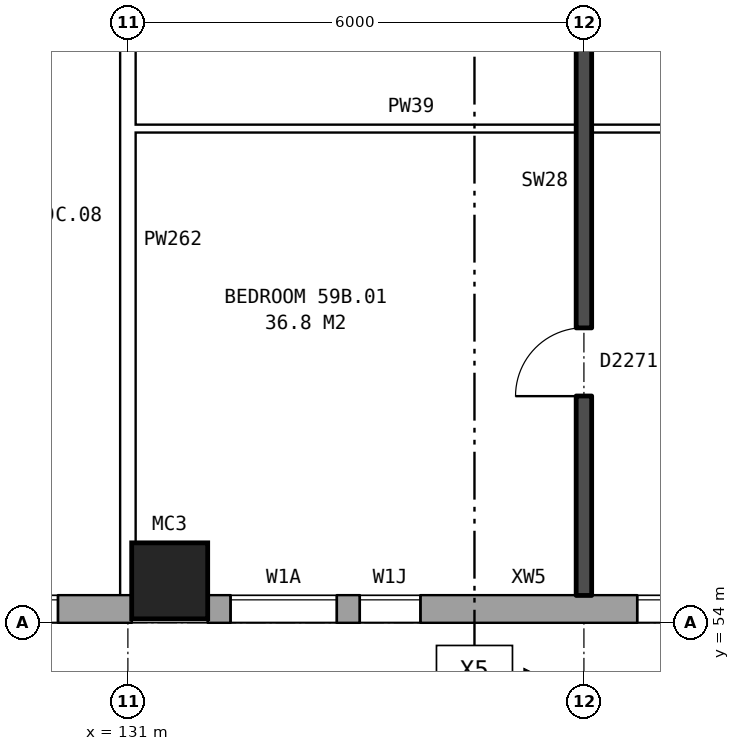
"""IFC4 building model, lengths in metres.
Left out: names, types, materials, properties, quantities, classifications, styles, units other than length and angle.
Written with IfcOpenShell. Run it as: python <this file> out.ifc"""

import sys

from ifc_helpers import new_model, si_unit, direction, frame, frame_2d, origin, origin_2d, place, context, subcontext, project, spatial, rectangle, hollow_rectangle, extrude, element, fill, save


model = new_model("IFC4")
c1 = context("Model", 3, precision=1e-05, world=origin(), true_north=direction((0.0, 1.0)))
c2 = subcontext(c1, "Body", "Model", "MODEL_VIEW")
j1 = project(units=[si_unit("LENGTHUNIT", "METRE"), si_unit("PLANEANGLEUNIT", "RADIAN")], contexts=[c1])
p1 = place(None, origin())
s1 = spatial("IfcSite", under=j1, at=p1, CompositionType="ELEMENT")
p2 = place(p1, origin())
s2 = spatial("IfcBuilding", under=s1, at=p2, CompositionType="ELEMENT")
p3 = place(p2, frame((0.0, 0.0, 209.0)))
s3 = spatial("IfcBuildingStorey", under=s2, at=p3, CompositionType="ELEMENT", Elevation=209.0)
p4 = place(p3, frame((131.55, 54.55, 0.0), z_axis=(0.0, 0.0, 1.0), x_axis=(1.0, 0.0, 0.0)))
e1 = element("IfcColumn", 1, at=p4, inside=s3, PredefinedType="COLUMN", context=c2, shape_type="SweptSolid", body=[
    extrude(hollow_rectangle(XDim=1.0, YDim=1.0, WallThickness=0.055, at=origin_2d()), origin(), (0.0, 0.0, 1.0), 3.1),
])
p5 = place(p3, frame((75.95, 54.18, 0.0), z_axis=(0.0, 0.0, 1.0), x_axis=(1.0, 0.0, 0.0)))
e2 = element("IfcWall", 2, at=p5, inside=s3, PredefinedType="STANDARD", context=c2, shape_type="SweptSolid", body=[
    extrude(rectangle(XDim=55.1, YDim=0.36, at=frame_2d((27.55, 0.0))), origin(), (0.0, 0.0, 1.0), 2.85),
])
p6 = place(p5, frame((0.969, 0.0, 0.8)))
e3 = element("IfcOpeningElement", 3, at=p6, cuts=e2, PredefinedType="OPENING", context=c2, shape_type="SweptSolid", body=[
    extrude(rectangle(XDim=1.6, YDim=1.8, at=frame_2d((0.8, 0.9))), frame((0.0, 0.19, 0.0), z_axis=(0.0, -1.0, 0.0), x_axis=(1.0, 0.0, 0.0)), (0.0, 0.0, 1.0), 0.38),
])
p7 = place(p5, frame((4.406, 0.0, 0.8)))
e4 = element("IfcOpeningElement", 4, at=p7, cuts=e2, PredefinedType="OPENING", context=c2, shape_type="SweptSolid", body=[
    extrude(rectangle(XDim=1.6, YDim=1.8, at=frame_2d((0.8, 0.9))), frame((0.0, 0.19, 0.0), z_axis=(0.0, -1.0, 0.0), x_axis=(1.0, 0.0, 0.0)), (0.0, 0.0, 1.0), 0.38),
])
p8 = place(p5, frame((7.844, 0.0, 0.8)))
e5 = element("IfcOpeningElement", 5, at=p8, cuts=e2, PredefinedType="OPENING", context=c2, shape_type="SweptSolid", body=[
    extrude(rectangle(XDim=1.6, YDim=1.8, at=frame_2d((0.8, 0.9))), frame((0.0, 0.19, 0.0), z_axis=(0.0, -1.0, 0.0), x_axis=(1.0, 0.0, 0.0)), (0.0, 0.0, 1.0), 0.38),
])
p9 = place(p5, frame((11.281, 0.0, 0.8)))
e6 = element("IfcOpeningElement", 6, at=p9, cuts=e2, PredefinedType="OPENING", context=c2, shape_type="SweptSolid", body=[
    extrude(rectangle(XDim=1.6, YDim=1.8, at=frame_2d((0.8, 0.9))), frame((0.0, 0.19, 0.0), z_axis=(0.0, -1.0, 0.0), x_axis=(1.0, 0.0, 0.0)), (0.0, 0.0, 1.0), 0.38),
])
p10 = place(p5, frame((14.719, 0.0, 0.8)))
e7 = element("IfcOpeningElement", 7, at=p10, cuts=e2, PredefinedType="OPENING", context=c2, shape_type="SweptSolid", body=[
    extrude(rectangle(XDim=1.6, YDim=1.8, at=frame_2d((0.8, 0.9))), frame((0.0, 0.19, 0.0), z_axis=(0.0, -1.0, 0.0), x_axis=(1.0, 0.0, 0.0)), (0.0, 0.0, 1.0), 0.38),
])
p11 = place(p5, frame((18.156, 0.0, 0.8)))
e8 = element("IfcOpeningElement", 8, at=p11, cuts=e2, PredefinedType="OPENING", context=c2, shape_type="SweptSolid", body=[
    extrude(rectangle(XDim=1.6, YDim=1.8, at=frame_2d((0.8, 0.9))), frame((0.0, 0.19, 0.0), z_axis=(0.0, -1.0, 0.0), x_axis=(1.0, 0.0, 0.0)), (0.0, 0.0, 1.0), 0.38),
])
p12 = place(p5, frame((21.594, 0.0, 0.8)))
e9 = element("IfcOpeningElement", 9, at=p12, cuts=e2, PredefinedType="OPENING", context=c2, shape_type="SweptSolid", body=[
    extrude(rectangle(XDim=1.6, YDim=1.8, at=frame_2d((0.8, 0.9))), frame((0.0, 0.19, 0.0), z_axis=(0.0, -1.0, 0.0), x_axis=(1.0, 0.0, 0.0)), (0.0, 0.0, 1.0), 0.38),
])
p13 = place(p5, frame((25.031, 0.0, 0.8)))
e10 = element("IfcOpeningElement", 10, at=p13, cuts=e2, PredefinedType="OPENING", context=c2, shape_type="SweptSolid", body=[
    extrude(rectangle(XDim=1.6, YDim=1.8, at=frame_2d((0.8, 0.9))), frame((0.0, 0.19, 0.0), z_axis=(0.0, -1.0, 0.0), x_axis=(1.0, 0.0, 0.0)), (0.0, 0.0, 1.0), 0.38),
])
p14 = place(p5, frame((28.469, 0.0, 0.8)))
e11 = element("IfcOpeningElement", 11, at=p14, cuts=e2, PredefinedType="OPENING", context=c2, shape_type="SweptSolid", body=[
    extrude(rectangle(XDim=1.6, YDim=1.8, at=frame_2d((0.8, 0.9))), frame((0.0, 0.19, 0.0), z_axis=(0.0, -1.0, 0.0), x_axis=(1.0, 0.0, 0.0)), (0.0, 0.0, 1.0), 0.38),
])
p15 = place(p5, frame((31.906, 0.0, 0.8)))
e12 = element("IfcOpeningElement", 12, at=p15, cuts=e2, PredefinedType="OPENING", context=c2, shape_type="SweptSolid", body=[
    extrude(rectangle(XDim=1.6, YDim=1.8, at=frame_2d((0.8, 0.9))), frame((0.0, 0.19, 0.0), z_axis=(0.0, -1.0, 0.0), x_axis=(1.0, 0.0, 0.0)), (0.0, 0.0, 1.0), 0.38),
])
p16 = place(p5, frame((35.344, 0.0, 0.8)))
e13 = element("IfcOpeningElement", 13, at=p16, cuts=e2, PredefinedType="OPENING", context=c2, shape_type="SweptSolid", body=[
    extrude(rectangle(XDim=1.6, YDim=1.8, at=frame_2d((0.8, 0.9))), frame((0.0, 0.19, 0.0), z_axis=(0.0, -1.0, 0.0), x_axis=(1.0, 0.0, 0.0)), (0.0, 0.0, 1.0), 0.38),
])
p17 = place(p5, frame((38.781, 0.0, 0.8)))
e14 = element("IfcOpeningElement", 14, at=p17, cuts=e2, PredefinedType="OPENING", context=c2, shape_type="SweptSolid", body=[
    extrude(rectangle(XDim=1.6, YDim=1.8, at=frame_2d((0.8, 0.9))), frame((0.0, 0.19, 0.0), z_axis=(0.0, -1.0, 0.0), x_axis=(1.0, 0.0, 0.0)), (0.0, 0.0, 1.0), 0.38),
])
p18 = place(p5, frame((42.219, 0.0, 0.8)))
e15 = element("IfcOpeningElement", 15, at=p18, cuts=e2, PredefinedType="OPENING", context=c2, shape_type="SweptSolid", body=[
    extrude(rectangle(XDim=1.6, YDim=1.8, at=frame_2d((0.8, 0.9))), frame((0.0, 0.19, 0.0), z_axis=(0.0, -1.0, 0.0), x_axis=(1.0, 0.0, 0.0)), (0.0, 0.0, 1.0), 0.38),
])
p19 = place(p5, frame((45.656, 0.0, 0.8)))
e16 = element("IfcOpeningElement", 16, at=p19, cuts=e2, PredefinedType="OPENING", context=c2, shape_type="SweptSolid", body=[
    extrude(rectangle(XDim=1.6, YDim=1.8, at=frame_2d((0.8, 0.9))), frame((0.0, 0.19, 0.0), z_axis=(0.0, -1.0, 0.0), x_axis=(1.0, 0.0, 0.0)), (0.0, 0.0, 1.0), 0.38),
])
p20 = place(p5, frame((49.094, 0.0, 0.8)))
e17 = element("IfcOpeningElement", 17, at=p20, cuts=e2, PredefinedType="OPENING", context=c2, shape_type="SweptSolid", body=[
    extrude(rectangle(XDim=1.6, YDim=1.8, at=frame_2d((0.8, 0.9))), frame((0.0, 0.19, 0.0), z_axis=(0.0, -1.0, 0.0), x_axis=(1.0, 0.0, 0.0)), (0.0, 0.0, 1.0), 0.38),
])
p21 = place(p5, frame((52.531, 0.0, 0.8)))
e18 = element("IfcOpeningElement", 18, at=p21, cuts=e2, PredefinedType="OPENING", context=c2, shape_type="SweptSolid", body=[
    extrude(rectangle(XDim=1.6, YDim=1.8, at=frame_2d((0.8, 0.9))), frame((0.0, 0.19, 0.0), z_axis=(0.0, -1.0, 0.0), x_axis=(1.0, 0.0, 0.0)), (0.0, 0.0, 1.0), 0.38),
])
p22 = place(p3, frame((132.05, 54.18, 0.0), z_axis=(0.0, 0.0, 1.0), x_axis=(1.0, 0.0, 0.0)))
e19 = element("IfcWall", 19, at=p22, inside=s3, PredefinedType="STANDARD", context=c2, shape_type="SweptSolid", body=[
    extrude(rectangle(XDim=33.875, YDim=0.36, at=frame_2d((16.938, 0.0))), origin(), (0.0, 0.0, 1.0), 2.85),
])
p23 = place(p22, frame((0.3, 0.0, 0.8)))
e20 = element("IfcOpeningElement", 20, at=p23, cuts=e19, PredefinedType="OPENING", context=c2, shape_type="SweptSolid", body=[
    extrude(rectangle(XDim=1.4, YDim=1.8, at=frame_2d((0.7, 0.9))), frame((0.0, 0.19, 0.0), z_axis=(0.0, -1.0, 0.0), x_axis=(1.0, 0.0, 0.0)), (0.0, 0.0, 1.0), 0.38),
])
p24 = place(p22, frame((5.65, 0.0, 0.8)))
e21 = element("IfcOpeningElement", 21, at=p24, cuts=e19, PredefinedType="OPENING", context=c2, shape_type="SweptSolid", body=[
    extrude(rectangle(XDim=1.6, YDim=1.8, at=frame_2d((0.8, 0.9))), frame((0.0, 0.19, 0.0), z_axis=(0.0, -1.0, 0.0), x_axis=(1.0, 0.0, 0.0)), (0.0, 0.0, 1.0), 0.38),
])
p25 = place(p22, frame((8.65, 0.0, 0.8)))
e22 = element("IfcOpeningElement", 22, at=p25, cuts=e19, PredefinedType="OPENING", context=c2, shape_type="SweptSolid", body=[
    extrude(rectangle(XDim=1.6, YDim=1.8, at=frame_2d((0.8, 0.9))), frame((0.0, 0.19, 0.0), z_axis=(0.0, -1.0, 0.0), x_axis=(1.0, 0.0, 0.0)), (0.0, 0.0, 1.0), 0.38),
])
p26 = place(p22, frame((11.65, 0.0, 0.8)))
e23 = element("IfcOpeningElement", 23, at=p26, cuts=e19, PredefinedType="OPENING", context=c2, shape_type="SweptSolid", body=[
    extrude(rectangle(XDim=1.6, YDim=1.8, at=frame_2d((0.8, 0.9))), frame((0.0, 0.19, 0.0), z_axis=(0.0, -1.0, 0.0), x_axis=(1.0, 0.0, 0.0)), (0.0, 0.0, 1.0), 0.38),
])
p27 = place(p22, frame((14.65, 0.0, 0.8)))
e24 = element("IfcOpeningElement", 24, at=p27, cuts=e19, PredefinedType="OPENING", context=c2, shape_type="SweptSolid", body=[
    extrude(rectangle(XDim=1.6, YDim=1.8, at=frame_2d((0.8, 0.9))), frame((0.0, 0.19, 0.0), z_axis=(0.0, -1.0, 0.0), x_axis=(1.0, 0.0, 0.0)), (0.0, 0.0, 1.0), 0.38),
])
p28 = place(p22, frame((17.65, 0.0, 0.8)))
e25 = element("IfcOpeningElement", 25, at=p28, cuts=e19, PredefinedType="OPENING", context=c2, shape_type="SweptSolid", body=[
    extrude(rectangle(XDim=1.6, YDim=1.8, at=frame_2d((0.8, 0.9))), frame((0.0, 0.19, 0.0), z_axis=(0.0, -1.0, 0.0), x_axis=(1.0, 0.0, 0.0)), (0.0, 0.0, 1.0), 0.38),
])
p29 = place(p22, frame((20.65, 0.0, 0.8)))
e26 = element("IfcOpeningElement", 26, at=p29, cuts=e19, PredefinedType="OPENING", context=c2, shape_type="SweptSolid", body=[
    extrude(rectangle(XDim=1.6, YDim=1.8, at=frame_2d((0.8, 0.9))), frame((0.0, 0.19, 0.0), z_axis=(0.0, -1.0, 0.0), x_axis=(1.0, 0.0, 0.0)), (0.0, 0.0, 1.0), 0.38),
])
p30 = place(p22, frame((23.65, 0.0, 0.8)))
e27 = element("IfcOpeningElement", 27, at=p30, cuts=e19, PredefinedType="OPENING", context=c2, shape_type="SweptSolid", body=[
    extrude(rectangle(XDim=1.6, YDim=1.8, at=frame_2d((0.8, 0.9))), frame((0.0, 0.19, 0.0), z_axis=(0.0, -1.0, 0.0), x_axis=(1.0, 0.0, 0.0)), (0.0, 0.0, 1.0), 0.38),
])
p31 = place(p22, frame((26.65, 0.0, 0.8)))
e28 = element("IfcOpeningElement", 28, at=p31, cuts=e19, PredefinedType="OPENING", context=c2, shape_type="SweptSolid", body=[
    extrude(rectangle(XDim=1.6, YDim=1.8, at=frame_2d((0.8, 0.9))), frame((0.0, 0.19, 0.0), z_axis=(0.0, -1.0, 0.0), x_axis=(1.0, 0.0, 0.0)), (0.0, 0.0, 1.0), 0.38),
])
p32 = place(p22, frame((29.65, 0.0, 0.8)))
e29 = element("IfcOpeningElement", 29, at=p32, cuts=e19, PredefinedType="OPENING", context=c2, shape_type="SweptSolid", body=[
    extrude(rectangle(XDim=1.6, YDim=1.8, at=frame_2d((0.8, 0.9))), frame((0.0, 0.19, 0.0), z_axis=(0.0, -1.0, 0.0), x_axis=(1.0, 0.0, 0.0)), (0.0, 0.0, 1.0), 0.38),
])
p33 = place(p22, frame((2.0, 0.0, 0.9)))
e30 = element("IfcOpeningElement", 30, at=p33, cuts=e19, PredefinedType="OPENING", context=c2, shape_type="SweptSolid", body=[
    extrude(rectangle(XDim=0.8, YDim=1.5, at=frame_2d((0.4, 0.75))), frame((0.0, 0.19, 0.0), z_axis=(0.0, -1.0, 0.0), x_axis=(1.0, 0.0, 0.0)), (0.0, 0.0, 1.0), 0.38),
])
p34 = place(p3, frame((131.1, 60.5, 0.0), z_axis=(0.0, 0.0, 1.0), x_axis=(1.0, 0.0, 0.0)))
e31 = element("IfcWall", 31, at=p34, inside=s3, PredefinedType="PARTITIONING", context=c2, shape_type="SweptSolid", body=[
    extrude(rectangle(XDim=11.8, YDim=0.1, at=frame_2d((5.9, 0.0))), origin(), (0.0, 0.0, 1.0), 2.85),
])
p35 = place(p34, frame((7.25, 0.0, 0.0)))
e32 = element("IfcOpeningElement", 32, at=p35, cuts=e31, PredefinedType="OPENING", context=c2, shape_type="SweptSolid", body=[
    extrude(rectangle(XDim=0.9, YDim=2.1, at=frame_2d((0.45, 1.05))), frame((0.0, 0.06, 0.0), z_axis=(0.0, -1.0, 0.0), x_axis=(1.0, 0.0, 0.0)), (0.0, 0.0, 1.0), 0.12),
])
p36 = place(p34, frame((10.2, 0.0, 0.0)))
e33 = element("IfcOpeningElement", 33, at=p36, cuts=e31, PredefinedType="OPENING", context=c2, shape_type="SweptSolid", body=[
    extrude(rectangle(XDim=0.9, YDim=2.1, at=frame_2d((0.45, 1.05))), frame((0.0, 0.06, 0.0), z_axis=(0.0, -1.0, 0.0), x_axis=(1.0, 0.0, 0.0)), (0.0, 0.0, 1.0), 0.12),
])
p37 = place(p3, frame((131.0, 54.36, 0.0), z_axis=(0.0, 0.0, 1.0), x_axis=(0.0, 1.0, 0.0)))
e34 = element("IfcWall", 34, at=p37, inside=s3, PredefinedType="PARTITIONING", context=c2, shape_type="SweptSolid", body=[
    extrude(rectangle(XDim=9.34, YDim=0.2, at=frame_2d((4.67, 0.0))), origin(), (0.0, 0.0, 1.0), 2.85),
])
p38 = place(p3, frame((137.0, 54.36, 0.0), z_axis=(0.0, 0.0, 1.0), x_axis=(0.0, 1.0, 0.0)))
e35 = element("IfcWall", 35, at=p38, inside=s3, PredefinedType="SOLIDWALL", context=c2, shape_type="SweptSolid", body=[
    extrude(rectangle(XDim=9.44, YDim=0.2, at=frame_2d((4.72, 0.0))), origin(), (0.0, 0.0, 1.0), 2.85),
])
p39 = place(p38, frame((2.62, 0.0, 0.0)))
e36 = element("IfcOpeningElement", 36, at=p39, cuts=e35, PredefinedType="OPENING", context=c2, shape_type="SweptSolid", body=[
    extrude(rectangle(XDim=0.9, YDim=2.1, at=frame_2d((0.45, 1.05))), frame((0.0, 0.11, 0.0), z_axis=(0.0, -1.0, 0.0), x_axis=(1.0, 0.0, 0.0)), (0.0, 0.0, 1.0), 0.22),
])
p40 = place(p38, frame((7.39, 0.0, 0.0)))
e37 = element("IfcOpeningElement", 37, at=p40, cuts=e35, PredefinedType="OPENING", context=c2, shape_type="SweptSolid", body=[
    extrude(rectangle(XDim=0.8, YDim=2.1, at=frame_2d((0.4, 1.05))), frame((0.0, 0.11, 0.0), z_axis=(0.0, -1.0, 0.0), x_axis=(1.0, 0.0, 0.0)), (0.0, 0.0, 1.0), 0.22),
])
p41 = place(p21, origin())
e38 = element("IfcWindow", 38, at=p41, inside=s3, PartitioningType="SINGLE_PANEL", PredefinedType="WINDOW", context=c2, shape_type="SweptSolid", body=[
    extrude(rectangle(XDim=1.6, YDim=1.8, at=frame_2d((0.8, 0.9))), frame((0.0, 0.15, 0.0), z_axis=(0.0, -1.0, 0.0), x_axis=(1.0, 0.0, 0.0)), (0.0, 0.0, 1.0), 0.06),
])
fill(e18, e38)
p42 = place(p23, origin())
e39 = element("IfcWindow", 39, at=p42, inside=s3, PartitioningType="SINGLE_PANEL", PredefinedType="WINDOW", context=c2, shape_type="SweptSolid", body=[
    extrude(rectangle(XDim=1.4, YDim=1.8, at=frame_2d((0.7, 0.9))), frame((0.0, 0.15, 0.0), z_axis=(0.0, -1.0, 0.0), x_axis=(1.0, 0.0, 0.0)), (0.0, 0.0, 1.0), 0.06),
])
fill(e20, e39)
p43 = place(p24, origin())
e40 = element("IfcWindow", 40, at=p43, inside=s3, PartitioningType="SINGLE_PANEL", PredefinedType="WINDOW", context=c2, shape_type="SweptSolid", body=[
    extrude(rectangle(XDim=1.6, YDim=1.8, at=frame_2d((0.8, 0.9))), frame((0.0, 0.15, 0.0), z_axis=(0.0, -1.0, 0.0), x_axis=(1.0, 0.0, 0.0)), (0.0, 0.0, 1.0), 0.06),
])
fill(e21, e40)
p44 = place(p39, origin())
e41 = element("IfcDoor", 41, at=p44, inside=s3, OperationType="SINGLE_SWING_LEFT", PredefinedType="DOOR", context=c2, shape_type="SweptSolid", body=[
    extrude(rectangle(XDim=0.9, YDim=2.1, at=frame_2d((0.45, 1.05))), frame((0.0, 0.025, 0.0), z_axis=(0.0, -1.0, 0.0), x_axis=(1.0, 0.0, 0.0)), (0.0, 0.0, 1.0), 0.05),
])
fill(e36, e41)
p45 = place(p33, origin())
e42 = element("IfcWindow", 42, at=p45, inside=s3, PartitioningType="SINGLE_PANEL", PredefinedType="WINDOW", context=c2, shape_type="SweptSolid", body=[
    extrude(rectangle(XDim=0.8, YDim=1.5, at=frame_2d((0.4, 0.75))), frame((0.0, 0.15, 0.0), z_axis=(0.0, -1.0, 0.0), x_axis=(1.0, 0.0, 0.0)), (0.0, 0.0, 1.0), 0.06),
])
fill(e30, e42)
save(model, sys.argv[1])
